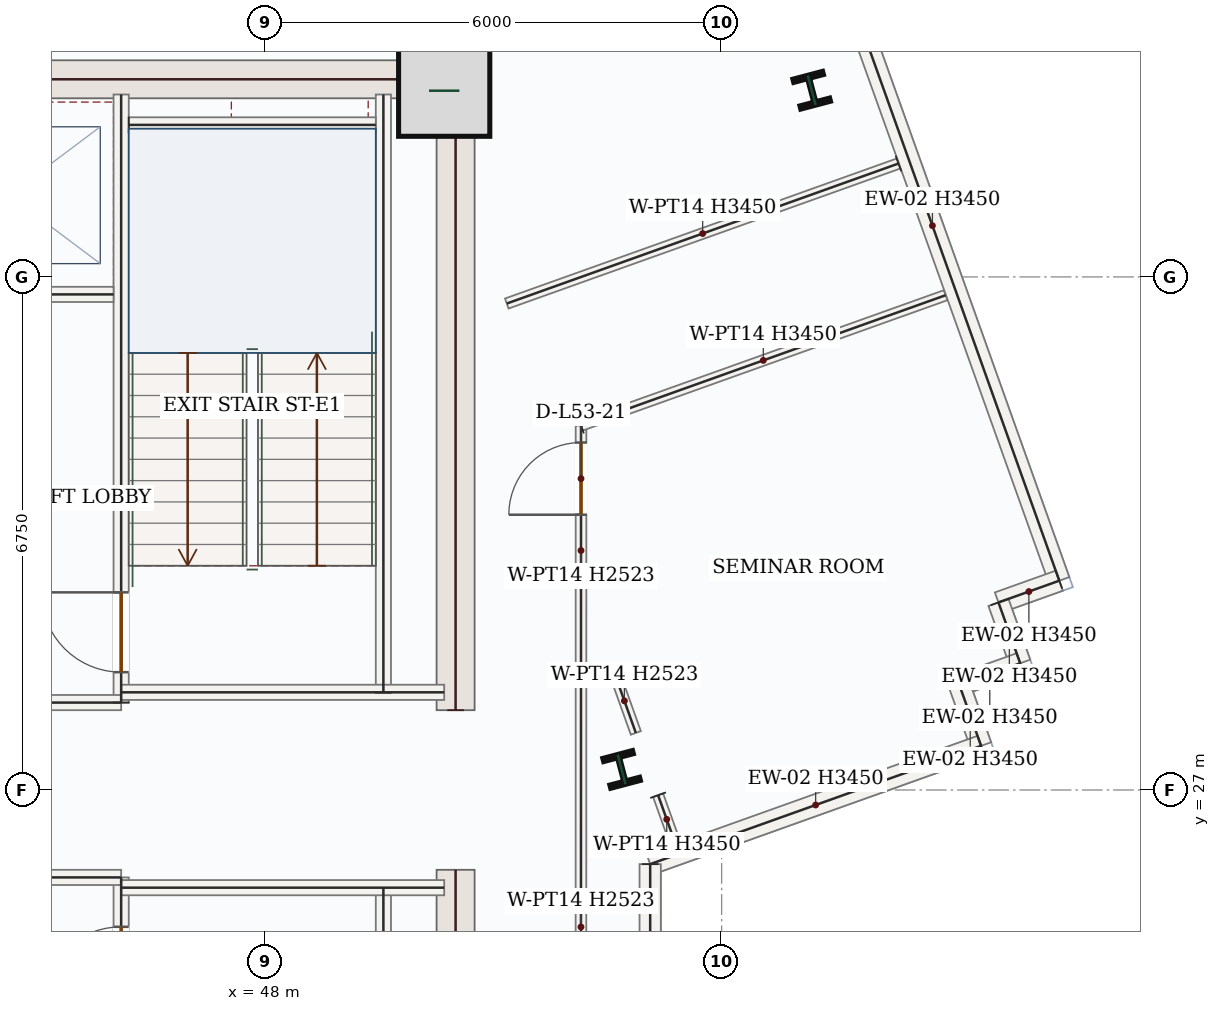
"""IFC4 building model, lengths in metres.
Left out: names, types, materials, properties, quantities, classifications, styles, units other than length and angle.
Written with IfcOpenShell. Run it as: python <this file> out.ifc"""

import sys

from ifc_helpers import new_model, si_unit, direction, frame, frame_2d, origin, origin_2d, place, context, subcontext, project, spatial, rectangle, i_section, extrude, source, transform, mapped, element, fill, save


model = new_model("IFC4")
c1 = context("Model", 3, precision=1e-05, world=origin(), true_north=direction((0.0, 1.0)))
c2 = subcontext(c1, "Body", "Model", "MODEL_VIEW")
j1 = project(units=[si_unit("LENGTHUNIT", "METRE"), si_unit("PLANEANGLEUNIT", "RADIAN")], contexts=[c1])
p1 = place(None, origin())
s1 = spatial("IfcSite", under=j1, at=p1, CompositionType="ELEMENT")
p2 = place(p1, origin())
s2 = spatial("IfcBuilding", under=s1, at=p2, CompositionType="ELEMENT")
p3 = place(p2, frame((0.0, 0.0, 225.3)))
s3 = spatial("IfcBuildingStorey", under=s2, at=p3, CompositionType="ELEMENT", Elevation=225.3)
m1 = source(origin(), c2, "Body", "SweptSolid", [
    extrude(rectangle(XDim=8.55, YDim=0.5, at=frame_2d((4.275, 0.0))), origin(), (0.0, 0.0, 1.0), 3.45),
])
for number, where, z_axis, x_axis in (
    (1, (50.5, 17.4, 0.0), (0.0, 0.0, 1.0), (0.0, 1.0, 0.0)),
    (2, (50.5, 28.05, 0.0), (0.0, 0.0, 1.0), (0.0, 1.0, 0.0)),
):
    element("IfcWall", number, at=place(p3, frame(where, z_axis=z_axis, x_axis=x_axis)), inside=s3, PredefinedType="SHEAR", context=c2, shape_type="MappedRepresentation", body=[
        mapped(m1, transform((0.0, 0.0, 0.0), x_axis=(1.0, 0.0, 0.0), y_axis=(0.0, 1.0, 0.0), z_axis=(0.0, 0.0, 1.0), scale=1.0)),
    ])
m2 = source(origin(), c2, "Body", "SweptSolid", [
    extrude(rectangle(XDim=7.0, YDim=0.5, at=frame_2d((3.5, 0.0))), origin(), (0.0, 0.0, 1.0), 3.45),
])
p4 = place(p3, frame((43.25, 36.35, 0.0), z_axis=(0.0, 0.0, 1.0), x_axis=(1.0, 0.0, 0.0)))
e3 = element("IfcWall", 3, at=p4, inside=s3, PredefinedType="SHEAR", context=c2, shape_type="MappedRepresentation", body=[
    mapped(m2, transform((0.0, 0.0, 0.0), x_axis=(1.0, 0.0, 0.0), y_axis=(0.0, 1.0, 0.0), z_axis=(0.0, 0.0, 1.0), scale=1.0)),
])
m3 = source(origin(), c2, "Body", "SweptSolid", [
    extrude(rectangle(XDim=1.2, YDim=1.2, at=origin_2d()), origin(), (0.0, 0.0, 1.0), 3.9),
])
p5 = place(p3, frame((50.35, 36.2, 0.0), z_axis=(0.0, 0.0, 1.0), x_axis=(1.0, 0.0, 0.0)))
e4 = element("IfcColumn", 4, at=p5, inside=s3, PredefinedType="COLUMN", context=c2, shape_type="MappedRepresentation", body=[
    mapped(m3, transform((0.0, 0.0, 0.0), x_axis=(1.0, 0.0, 0.0), y_axis=(0.0, 1.0, 0.0), z_axis=(0.0, 0.0, 1.0), scale=1.0)),
])
m4 = source(origin(), c2, "Body", "SweptSolid", [
    extrude(i_section(OverallWidth=0.404, OverallDepth=0.407, WebThickness=0.027, FlangeThickness=0.044, FilletRadius=0.018, at=origin_2d()), origin(), (0.0, 0.0, 1.0), 3.9),
])
for number, where, z_axis, x_axis in (
    (5, (52.684, 27.271, 0.0), (0.0, 0.0, 1.0), (0.967, 0.255, 0.0)),
    (6, (55.185, 36.206, 0.0), (0.0, 0.0, 1.0), (0.967, 0.255, 0.0)),
):
    element("IfcColumn", number, at=place(p3, frame(where, z_axis=z_axis, x_axis=x_axis)), inside=s3, PredefinedType="COLUMN", context=c2, shape_type="MappedRepresentation", body=[
        mapped(m4, transform((0.0, 0.0, 0.0), x_axis=(1.0, 0.0, 0.0), y_axis=(0.0, 1.0, 0.0), z_axis=(0.0, 0.0, 1.0), scale=1.0)),
    ])
m5 = source(origin(), c2, "Body", "SweptSolid", [
    extrude(rectangle(XDim=9.92, YDim=0.28, at=frame_2d((4.96, 0.0))), origin(), (0.0, 0.0, 1.0), 3.45),
])
p6 = place(p3, frame((55.104, 39.095, 0.0), z_axis=(0.0, 0.0, 1.0), x_axis=(0.336532833412, -0.941671732631, 0.0)))
e7 = element("IfcWall", 7, at=p6, inside=s3, PredefinedType="SOLIDWALL", context=c2, shape_type="MappedRepresentation", body=[
    mapped(m5, transform((0.0, 0.0, 0.0), x_axis=(1.0, 0.0, 0.0), y_axis=(0.0, 1.0, 0.0), z_axis=(0.0, 0.0, 1.0), scale=1.0)),
])
m6 = source(origin(), c2, "Body", "SweptSolid", [
    extrude(rectangle(XDim=0.85, YDim=0.28, at=frame_2d((0.425, 0.0))), origin(), (0.0, 0.0, 1.0), 3.45),
])
p7 = place(p3, frame((58.442, 29.754, 0.0), z_axis=(0.0, 0.0, 1.0), x_axis=(-0.941624872587, -0.33666392638, 0.0)))
e8 = element("IfcWall", 8, at=p7, inside=s3, PredefinedType="SOLIDWALL", context=c2, shape_type="MappedRepresentation", body=[
    mapped(m6, transform((0.0, 0.0, 0.0), x_axis=(1.0, 0.0, 0.0), y_axis=(0.0, 1.0, 0.0), z_axis=(0.0, 0.0, 1.0), scale=1.0)),
])
m7 = source(origin(), c2, "Body", "SweptSolid", [
    extrude(rectangle(XDim=0.85, YDim=0.28, at=frame_2d((0.425, 0.0))), origin(), (0.0, 0.0, 1.0), 3.45),
])
p8 = place(p3, frame((57.642, 29.468, 0.0), z_axis=(0.0, 0.0, 1.0), x_axis=(0.336318202891, -0.941748409292, 0.0)))
e9 = element("IfcWall", 9, at=p8, inside=s3, PredefinedType="SOLIDWALL", context=c2, shape_type="MappedRepresentation", body=[
    mapped(m7, transform((0.0, 0.0, 0.0), x_axis=(1.0, 0.0, 0.0), y_axis=(0.0, 1.0, 0.0), z_axis=(0.0, 0.0, 1.0), scale=1.0)),
])
p9 = place(p3, frame((57.928, 28.667, 0.0), z_axis=(0.0, 0.0, 1.0), x_axis=(-0.941715910258, -0.336409191858, 0.0)))
e10 = element("IfcWall", 10, at=p9, inside=s3, PredefinedType="SOLIDWALL", context=c2, shape_type="MappedRepresentation", body=[
    mapped(m6, transform((0.0, 0.0, 0.0), x_axis=(1.0, 0.0, 0.0), y_axis=(0.0, 1.0, 0.0), z_axis=(0.0, 0.0, 1.0), scale=1.0)),
])
p10 = place(p3, frame((57.128, 28.381, 0.0), z_axis=(0.0, 0.0, 1.0), x_axis=(0.336572886112, -0.941657417713, 0.0)))
e11 = element("IfcWall", 11, at=p10, inside=s3, PredefinedType="SOLIDWALL", context=c2, shape_type="MappedRepresentation", body=[
    mapped(m7, transform((0.0, 0.0, 0.0), x_axis=(1.0, 0.0, 0.0), y_axis=(0.0, 1.0, 0.0), z_axis=(0.0, 0.0, 1.0), scale=1.0)),
])
m8 = source(origin(), c2, "Body", "SweptSolid", [
    extrude(rectangle(XDim=4.624, YDim=0.28, at=frame_2d((2.312, 0.0))), origin(), (0.0, 0.0, 1.0), 3.45),
])
p11 = place(p3, frame((57.414, 27.581, 0.0), z_axis=(0.0, 0.0, 1.0), x_axis=(-0.941673795185, -0.336527062004, 0.0)))
e12 = element("IfcWall", 12, at=p11, inside=s3, PredefinedType="SOLIDWALL", context=c2, shape_type="MappedRepresentation", body=[
    mapped(m8, transform((0.0, 0.0, 0.0), x_axis=(1.0, 0.0, 0.0), y_axis=(0.0, 1.0, 0.0), z_axis=(0.0, 0.0, 1.0), scale=1.0)),
])
m9 = source(origin(), c2, "Body", "SweptSolid", [
    extrude(rectangle(XDim=7.567, YDim=0.28, at=frame_2d((3.783, 0.0))), origin(), (0.0, 0.0, 1.0), 3.45),
])
p12 = place(p3, frame((53.06, 26.025, 0.0), z_axis=(0.0, 0.0, 1.0), x_axis=(0.0, -1.0, 0.0)))
e13 = element("IfcWall", 13, at=p12, inside=s3, PredefinedType="SOLIDWALL", context=c2, shape_type="MappedRepresentation", body=[
    mapped(m9, transform((0.0, 0.0, 0.0), x_axis=(1.0, 0.0, 0.0), y_axis=(0.0, 1.0, 0.0), z_axis=(0.0, 0.0, 1.0), scale=1.0)),
])
m10 = source(origin(), c2, "Body", "SweptSolid", [
    extrude(rectangle(XDim=7.87, YDim=0.2, at=frame_2d((3.935, 0.0))), origin(), (0.0, 0.0, 1.0), 3.45),
])
for number, where, z_axis, x_axis in (
    (14, (49.55, 17.85, 0.0), (0.0, 0.0, 1.0), (0.0, 1.0, 0.0)),
    (15, (49.55, 28.28, 0.0), (0.0, 0.0, 1.0), (0.0, 1.0, 0.0)),
):
    element("IfcWall", number, at=place(p3, frame(where, z_axis=z_axis, x_axis=x_axis)), inside=s3, PredefinedType="SOLIDWALL", context=c2, shape_type="MappedRepresentation", body=[
        mapped(m10, transform((0.0, 0.0, 0.0), x_axis=(1.0, 0.0, 0.0), y_axis=(0.0, 1.0, 0.0), z_axis=(0.0, 0.0, 1.0), scale=1.0)),
    ])
p13 = place(p3, frame((46.1, 17.85, 0.0), z_axis=(0.0, 0.0, 1.0), x_axis=(0.0, 1.0, 0.0)))
e16 = element("IfcWall", 16, at=p13, inside=s3, PredefinedType="SOLIDWALL", context=c2, shape_type="SweptSolid", body=[
    extrude(rectangle(XDim=8.0, YDim=0.2, at=frame_2d((4.0, 0.0))), origin(), (0.0, 0.0, 1.0), 3.45),
])
p14 = place(p13, frame((6.3, 0.0, 0.0)))
e17 = element("IfcOpeningElement", 17, at=p14, cuts=e16, PredefinedType="OPENING", context=c2, shape_type="SweptSolid", body=[
    extrude(rectangle(XDim=1.05, YDim=2.15, at=frame_2d((0.525, 1.075))), frame((0.0, 0.11, 0.0), z_axis=(0.0, -1.0, 0.0), x_axis=(1.0, 0.0, 0.0)), (0.0, 0.0, 1.0), 0.22),
])
p15 = place(p3, frame((46.1, 28.15, 0.0), z_axis=(0.0, 0.0, 1.0), x_axis=(0.0, 1.0, 0.0)))
e18 = element("IfcWall", 18, at=p15, inside=s3, PredefinedType="SOLIDWALL", context=c2, shape_type="SweptSolid", body=[
    extrude(rectangle(XDim=8.0, YDim=0.2, at=frame_2d((4.0, 0.0))), origin(), (0.0, 0.0, 1.0), 3.45),
])
p16 = place(p15, frame((0.4, 0.0, 0.0)))
e19 = element("IfcOpeningElement", 19, at=p16, cuts=e18, PredefinedType="OPENING", context=c2, shape_type="SweptSolid", body=[
    extrude(rectangle(XDim=1.05, YDim=2.15, at=frame_2d((0.525, 1.075))), frame((0.0, 0.11, 0.0), z_axis=(0.0, -1.0, 0.0), x_axis=(1.0, 0.0, 0.0)), (0.0, 0.0, 1.0), 0.22),
])
m11 = source(origin(), c2, "Body", "SweptSolid", [
    extrude(rectangle(XDim=3.0, YDim=0.2, at=frame_2d((1.5, 0.0))), origin(), (0.0, 0.0, 1.0), 3.45),
])
p17 = place(p3, frame((43.1, 25.85, 0.0), z_axis=(0.0, 0.0, 1.0), x_axis=(1.0, 0.0, 0.0)))
e20 = element("IfcWall", 20, at=p17, inside=s3, PredefinedType="SOLIDWALL", context=c2, shape_type="MappedRepresentation", body=[
    mapped(m11, transform((0.0, 0.0, 0.0), x_axis=(1.0, 0.0, 0.0), y_axis=(0.0, 1.0, 0.0), z_axis=(0.0, 0.0, 1.0), scale=1.0)),
])
m12 = source(origin(), c2, "Body", "SweptSolid", [
    extrude(rectangle(XDim=4.25, YDim=0.2, at=frame_2d((2.125, 0.0))), origin(), (0.0, 0.0, 1.0), 3.45),
])
p18 = place(p3, frame((46.1, 25.715, 0.0), z_axis=(0.0, 0.0, 1.0), x_axis=(1.0, 0.0, 0.0)))
e21 = element("IfcWall", 21, at=p18, inside=s3, PredefinedType="SOLIDWALL", context=c2, shape_type="MappedRepresentation", body=[
    mapped(m12, transform((0.0, 0.0, 0.0), x_axis=(1.0, 0.0, 0.0), y_axis=(0.0, 1.0, 0.0), z_axis=(0.0, 0.0, 1.0), scale=1.0)),
])
p19 = place(p3, frame((43.1, 28.15, 0.0), z_axis=(0.0, 0.0, 1.0), x_axis=(1.0, 0.0, 0.0)))
e22 = element("IfcWall", 22, at=p19, inside=s3, PredefinedType="SOLIDWALL", context=c2, shape_type="MappedRepresentation", body=[
    mapped(m11, transform((0.0, 0.0, 0.0), x_axis=(1.0, 0.0, 0.0), y_axis=(0.0, 1.0, 0.0), z_axis=(0.0, 0.0, 1.0), scale=1.0)),
])
p20 = place(p3, frame((46.1, 28.285, 0.0), z_axis=(0.0, 0.0, 1.0), x_axis=(1.0, 0.0, 0.0)))
e23 = element("IfcWall", 23, at=p20, inside=s3, PredefinedType="SOLIDWALL", context=c2, shape_type="MappedRepresentation", body=[
    mapped(m12, transform((0.0, 0.0, 0.0), x_axis=(1.0, 0.0, 0.0), y_axis=(0.0, 1.0, 0.0), z_axis=(0.0, 0.0, 1.0), scale=1.0)),
])
m13 = source(origin(), c2, "Body", "SweptSolid", [
    extrude(rectangle(XDim=3.25, YDim=0.2, at=frame_2d((1.625, 0.0))), origin(), (0.0, 0.0, 1.0), 3.45),
])
p21 = place(p3, frame((46.2, 35.75, 0.0), z_axis=(0.0, 0.0, 1.0), x_axis=(1.0, 0.0, 0.0)))
e24 = element("IfcWall", 24, at=p21, inside=s3, PredefinedType="SOLIDWALL", context=c2, shape_type="MappedRepresentation", body=[
    mapped(m13, transform((0.0, 0.0, 0.0), x_axis=(1.0, 0.0, 0.0), y_axis=(0.0, 1.0, 0.0), z_axis=(0.0, 0.0, 1.0), scale=1.0)),
])
p22 = place(p3, frame((43.25, 33.52, 0.0), z_axis=(0.0, 0.0, 1.0), x_axis=(1.0, 0.0, 0.0)))
e25 = element("IfcWall", 25, at=p22, inside=s3, PredefinedType="SOLIDWALL", context=c2, shape_type="SweptSolid", body=[
    extrude(rectangle(XDim=2.75, YDim=0.2, at=frame_2d((1.375, 0.0))), origin(), (0.0, 0.0, 1.0), 3.45),
])
p23 = place(p22, frame((0.82, 0.0, 0.0)))
e26 = element("IfcOpeningElement", 26, at=p23, cuts=e25, PredefinedType="OPENING", context=c2, shape_type="SweptSolid", body=[
    extrude(rectangle(XDim=1.1, YDim=2.15, at=frame_2d((0.55, 1.075))), frame((0.0, 0.11, 0.0), z_axis=(0.0, -1.0, 0.0), x_axis=(1.0, 0.0, 0.0)), (0.0, 0.0, 1.0), 0.22),
])
m14 = source(origin(), c2, "Body", "SweptSolid", [
    extrude(rectangle(XDim=9.038, YDim=0.14, at=frame_2d((4.519, 0.0))), origin(), (0.0, 0.0, 1.0), 2.523),
])
p24 = place(p3, frame((52.149, 20.68, 0.0), z_axis=(0.0, 0.0, 1.0), x_axis=(0.000135065776, 0.999999990879, 0.0)))
e27 = element("IfcWall", 27, at=p24, inside=s3, PredefinedType="PARTITIONING", context=c2, shape_type="MappedRepresentation", body=[
    mapped(m14, transform((0.0, 0.0, 0.0), x_axis=(1.0, 0.0, 0.0), y_axis=(0.0, 1.0, 0.0), z_axis=(0.0, 0.0, 1.0), scale=1.0)),
])
m15 = source(origin(), c2, "Body", "SweptSolid", [
    extrude(rectangle(XDim=0.896, YDim=0.14, at=frame_2d((0.448, 0.0))), origin(), (0.0, 0.0, 1.0), 2.523),
])
p25 = place(p3, frame((52.57, 28.595, 0.0), z_axis=(0.0, 0.0, 1.0), x_axis=(0.336509001165, -0.941680249413, 0.0)))
e28 = element("IfcWall", 28, at=p25, inside=s3, PredefinedType="PARTITIONING", context=c2, shape_type="MappedRepresentation", body=[
    mapped(m15, transform((0.0, 0.0, 0.0), x_axis=(1.0, 0.0, 0.0), y_axis=(0.0, 1.0, 0.0), z_axis=(0.0, 0.0, 1.0), scale=1.0)),
])
m16 = source(origin(), c2, "Body", "SweptSolid", [
    extrude(rectangle(XDim=0.674, YDim=0.14, at=frame_2d((0.337, 0.0))), origin(), (0.0, 0.0, 1.0), 3.45),
])
p26 = place(p3, frame((53.164, 26.931, 0.0), z_axis=(0.0, 0.0, 1.0), x_axis=(0.336588856473, -0.941651709337, 0.0)))
e29 = element("IfcWall", 29, at=p26, inside=s3, PredefinedType="PARTITIONING", context=c2, shape_type="MappedRepresentation", body=[
    mapped(m16, transform((0.0, 0.0, 0.0), x_axis=(1.0, 0.0, 0.0), y_axis=(0.0, 1.0, 0.0), z_axis=(0.0, 0.0, 1.0), scale=1.0)),
])
p27 = place(p3, frame((52.15, 29.829, 0.0), z_axis=(0.0, 0.0, 1.0), x_axis=(0.0, 1.0, 0.0)))
e30 = element("IfcWall", 30, at=p27, inside=s3, PredefinedType="PARTITIONING", context=c2, shape_type="SweptSolid", body=[
    extrude(rectangle(XDim=1.966, YDim=0.14, at=frame_2d((0.983, 0.0))), origin(), (0.0, 0.0, 1.0), 2.523),
])
p28 = place(p27, frame((0.792, 0.0, 0.0)))
e31 = element("IfcOpeningElement", 31, at=p28, cuts=e30, PredefinedType="OPENING", context=c2, shape_type="SweptSolid", body=[
    extrude(rectangle(XDim=0.95, YDim=2.15, at=frame_2d((0.475, 1.075))), frame((0.0, 0.08, 0.0), z_axis=(0.0, -1.0, 0.0), x_axis=(1.0, 0.0, 0.0)), (0.0, 0.0, 1.0), 0.16),
])
m17 = source(origin(), c2, "Body", "SweptSolid", [
    extrude(rectangle(XDim=5.093, YDim=0.14, at=frame_2d((2.547, 0.0))), origin(), (0.0, 0.0, 1.0), 3.45),
])
p29 = place(p3, frame((52.15, 31.795, 0.0), z_axis=(0.0, 0.0, 1.0), x_axis=(0.941667058904, 0.336545910947, 0.0)))
e32 = element("IfcWall", 32, at=p29, inside=s3, PredefinedType="PARTITIONING", context=c2, shape_type="MappedRepresentation", body=[
    mapped(m17, transform((0.0, 0.0, 0.0), x_axis=(1.0, 0.0, 0.0), y_axis=(0.0, 1.0, 0.0), z_axis=(0.0, 0.0, 1.0), scale=1.0)),
])
m18 = source(origin(), c2, "Body", "SweptSolid", [
    extrude(rectangle(XDim=5.473, YDim=0.14, at=frame_2d((2.736, 0.0))), origin(), (0.0, 0.0, 1.0), 3.45),
])
p30 = place(p3, frame((56.327, 35.242, 0.0), z_axis=(0.0, 0.0, 1.0), x_axis=(-0.941665179086, -0.336551170695, 0.0)))
e33 = element("IfcWall", 33, at=p30, inside=s3, PredefinedType="PARTITIONING", context=c2, shape_type="MappedRepresentation", body=[
    mapped(m18, transform((0.0, 0.0, 0.0), x_axis=(1.0, 0.0, 0.0), y_axis=(0.0, 1.0, 0.0), z_axis=(0.0, 0.0, 1.0), scale=1.0)),
])
m19 = source(origin(), c2, "Body", "SweptSolid", [
    extrude(rectangle(XDim=1.05, YDim=2.15, at=frame_2d((0.525, 1.075))), frame((0.0, 0.025, 0.0), z_axis=(0.0, -1.0, 0.0), x_axis=(1.0, 0.0, 0.0)), (0.0, 0.0, 1.0), 0.05),
])
p31 = place(p16, origin())
e34 = element("IfcDoor", 34, at=p31, inside=s3, OperationType="SINGLE_SWING_RIGHT", PredefinedType="DOOR", context=c2, shape_type="MappedRepresentation", body=[
    mapped(m19, transform((0.0, 0.0, 0.0), x_axis=(1.0, 0.0, 0.0), y_axis=(0.0, 1.0, 0.0), z_axis=(0.0, 0.0, 1.0), scale=1.0)),
])
fill(e19, e34)
p32 = place(p14, origin())
e35 = element("IfcDoor", 35, at=p32, inside=s3, OperationType="SINGLE_SWING_LEFT", PredefinedType="DOOR", context=c2, shape_type="MappedRepresentation", body=[
    mapped(m19, transform((0.0, 0.0, 0.0), x_axis=(1.0, 0.0, 0.0), y_axis=(0.0, 1.0, 0.0), z_axis=(0.0, 0.0, 1.0), scale=1.0)),
])
fill(e17, e35)
m20 = source(origin(), c2, "Body", "SweptSolid", [
    extrude(rectangle(XDim=0.95, YDim=2.15, at=frame_2d((0.475, 1.075))), frame((0.0, 0.025, 0.0), z_axis=(0.0, -1.0, 0.0), x_axis=(1.0, 0.0, 0.0)), (0.0, 0.0, 1.0), 0.05),
])
p33 = place(p28, origin())
e36 = element("IfcDoor", 36, at=p33, inside=s3, OperationType="SINGLE_SWING_LEFT", PredefinedType="DOOR", context=c2, shape_type="MappedRepresentation", body=[
    mapped(m20, transform((0.0, 0.0, 0.0), x_axis=(1.0, 0.0, 0.0), y_axis=(0.0, 1.0, 0.0), z_axis=(0.0, 0.0, 1.0), scale=1.0)),
])
fill(e31, e36)
save(model, sys.argv[1])
